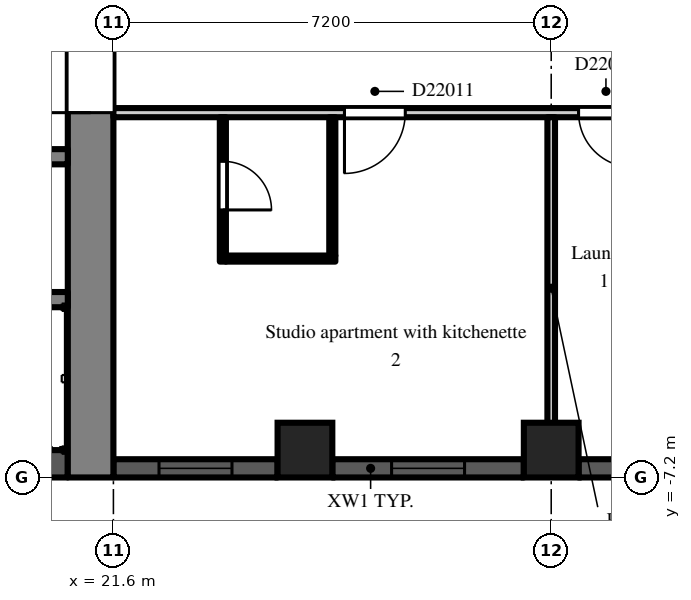
"""IFC4 building model, lengths in metres.
Left out: names, types, materials, properties, quantities, classifications, styles, units other than length and angle.
Written with IfcOpenShell. Run it as: python <this file> out.ifc"""

import sys

from ifc_helpers import new_model, si_unit, direction, frame, frame_2d, origin, origin_2d, place, context, subcontext, project, spatial, rectangle, extrude, element, fill, save


model = new_model("IFC4")
c1 = context("Model", 3, precision=1e-05, world=origin(), true_north=direction((0.0, 1.0)))
c2 = subcontext(c1, "Body", "Model", "MODEL_VIEW")
j1 = project(units=[si_unit("LENGTHUNIT", "METRE"), si_unit("PLANEANGLEUNIT", "RADIAN")], contexts=[c1])
p1 = place(None, origin())
s1 = spatial("IfcSite", under=j1, at=p1, CompositionType="ELEMENT")
p2 = place(p1, origin())
s2 = spatial("IfcBuilding", under=s1, at=p2, CompositionType="ELEMENT")
p3 = place(p2, frame((0.0, 0.0, 159.3)))
s3 = spatial("IfcBuildingStorey", under=s2, at=p3, CompositionType="ELEMENT", Elevation=159.3)
for number, where, z_axis, x_axis in (
    (1, (24.75, -6.75, 0.0), (0.0, 0.0, 1.0), (1.0, 0.0, 0.0)),
    (2, (28.8, -6.75, 0.0), (0.0, 0.0, 1.0), (1.0, 0.0, 0.0)),
):
    element("IfcColumn", number, at=place(p3, frame(where, z_axis=z_axis, x_axis=x_axis)), inside=s3, PredefinedType="COLUMN", context=c2, shape_type="SweptSolid", body=[
        extrude(rectangle(XDim=0.9, YDim=0.9, at=origin_2d()), origin(), (0.0, 0.0, 1.0), 3.0),
    ])
p4 = place(p3, frame((21.6, -7.05, 0.0), z_axis=(0.0, 0.0, 1.0), x_axis=(1.0, 0.0, 0.0)))
e3 = element("IfcWall", 3, at=p4, inside=s3, PredefinedType="SOLIDWALL", context=c2, shape_type="SweptSolid", body=[
    extrude(rectangle(XDim=2.7, YDim=0.3, at=frame_2d((1.35, 0.0))), origin(), (0.0, 0.0, 1.0), 2.2),
])
p5 = place(p4, frame((0.75, 0.0, 0.2)))
e4 = element("IfcOpeningElement", 4, at=p5, cuts=e3, PredefinedType="OPENING", context=c2, shape_type="SweptSolid", body=[
    extrude(rectangle(XDim=1.2, YDim=1.85, at=frame_2d((0.6, 0.925))), frame((0.0, 0.16, 0.0), z_axis=(0.0, -1.0, 0.0), x_axis=(1.0, 0.0, 0.0)), (0.0, 0.0, 1.0), 0.32),
])
p6 = place(p3, frame((25.2, -7.05, 0.0), z_axis=(0.0, 0.0, 1.0), x_axis=(1.0, 0.0, 0.0)))
e5 = element("IfcWall", 5, at=p6, inside=s3, PredefinedType="SOLIDWALL", context=c2, shape_type="SweptSolid", body=[
    extrude(rectangle(XDim=3.15, YDim=0.3, at=frame_2d((1.575, 0.0))), origin(), (0.0, 0.0, 1.0), 2.2),
])
p7 = place(p6, frame((0.975, 0.0, 0.2)))
e6 = element("IfcOpeningElement", 6, at=p7, cuts=e5, PredefinedType="OPENING", context=c2, shape_type="SweptSolid", body=[
    extrude(rectangle(XDim=1.2, YDim=1.85, at=frame_2d((0.6, 0.925))), frame((0.0, 0.16, 0.0), z_axis=(0.0, -1.0, 0.0), x_axis=(1.0, 0.0, 0.0)), (0.0, 0.0, 1.0), 0.32),
])
p8 = place(p3, frame((29.25, -7.05, 0.0), z_axis=(0.0, 0.0, 1.0), x_axis=(1.0, 0.0, 0.0)))
e7 = element("IfcWall", 7, at=p8, inside=s3, PredefinedType="SOLIDWALL", context=c2, shape_type="SweptSolid", body=[
    extrude(rectangle(XDim=6.3, YDim=0.3, at=frame_2d((3.15, 0.0))), origin(), (0.0, 0.0, 1.0), 2.2),
])
p9 = place(p8, frame((4.125, 0.0, 0.2)))
e8 = element("IfcOpeningElement", 8, at=p9, cuts=e7, PredefinedType="OPENING", context=c2, shape_type="SweptSolid", body=[
    extrude(rectangle(XDim=1.2, YDim=1.85, at=frame_2d((0.6, 0.925))), frame((0.0, 0.16, 0.0), z_axis=(0.0, -1.0, 0.0), x_axis=(1.0, 0.0, 0.0)), (0.0, 0.0, 1.0), 0.32),
])
p10 = place(p3, frame((21.225, -7.2, 0.0), z_axis=(0.0, 0.0, 1.0), x_axis=(0.0, 1.0, 0.0)))
e9 = element("IfcWall", 9, at=p10, inside=s3, PredefinedType="SHEAR", context=c2, shape_type="SweptSolid", body=[
    extrude(rectangle(XDim=14.4, YDim=0.75, at=frame_2d((7.2, 0.0))), origin(), (0.0, 0.0, 1.0), 2.55),
])
p11 = place(p10, frame((6.0, 0.0, 0.0)))
e10 = element("IfcOpeningElement", 10, at=p11, cuts=e9, PredefinedType="OPENING", context=c2, shape_type="SweptSolid", body=[
    extrude(rectangle(XDim=2.4, YDim=2.2, at=frame_2d((1.2, 1.1))), frame((0.0, 0.385, 0.0), z_axis=(0.0, -1.0, 0.0), x_axis=(1.0, 0.0, 0.0)), (0.0, 0.0, 1.0), 0.77),
])
p12 = place(p3, frame((7.9, -6.975, 0.0), z_axis=(0.0, 0.0, 1.0), x_axis=(1.0, 0.0, 0.0)))
e11 = element("IfcWall", 11, at=p12, inside=s3, PredefinedType="SHEAR", context=c2, shape_type="SweptSolid", body=[
    extrude(rectangle(XDim=12.95, YDim=0.45, at=frame_2d((6.475, 0.0))), origin(), (0.0, 0.0, 1.0), 2.55),
])
p13 = place(p3, frame((7.9, -1.925, 0.0), z_axis=(0.0, 0.0, 1.0), x_axis=(1.0, 0.0, 0.0)))
e12 = element("IfcWall", 12, at=p13, inside=s3, PredefinedType="SHEAR", context=c2, shape_type="SweptSolid", body=[
    extrude(rectangle(XDim=12.95, YDim=0.25, at=frame_2d((6.475, 0.0))), origin(), (0.0, 0.0, 1.0), 2.55),
])
p14 = place(p13, frame((0.525, 0.0, 0.0)))
e13 = element("IfcOpeningElement", 13, at=p14, cuts=e12, PredefinedType="OPENING", context=c2, shape_type="SweptSolid", body=[
    extrude(rectangle(XDim=0.9, YDim=2.1, at=frame_2d((0.45, 1.05))), frame((0.0, 0.135, 0.0), z_axis=(0.0, -1.0, 0.0), x_axis=(1.0, 0.0, 0.0)), (0.0, 0.0, 1.0), 0.27),
])
p15 = place(p13, frame((2.625, 0.0, 0.0)))
e14 = element("IfcOpeningElement", 14, at=p15, cuts=e12, PredefinedType="OPENING", context=c2, shape_type="SweptSolid", body=[
    extrude(rectangle(XDim=1.1, YDim=2.1, at=frame_2d((0.55, 1.05))), frame((0.0, 0.135, 0.0), z_axis=(0.0, -1.0, 0.0), x_axis=(1.0, 0.0, 0.0)), (0.0, 0.0, 1.0), 0.27),
])
p16 = place(p13, frame((8.225, 0.0, 0.0)))
e15 = element("IfcOpeningElement", 15, at=p16, cuts=e12, PredefinedType="OPENING", context=c2, shape_type="SweptSolid", body=[
    extrude(rectangle(XDim=0.9, YDim=2.1, at=frame_2d((0.45, 1.05))), frame((0.0, 0.135, 0.0), z_axis=(0.0, -1.0, 0.0), x_axis=(1.0, 0.0, 0.0)), (0.0, 0.0, 1.0), 0.27),
])
p17 = place(p3, frame((12.3, -4.275, 0.0), z_axis=(0.0, 0.0, 1.0), x_axis=(1.0, 0.0, 0.0)))
e16 = element("IfcWall", 16, at=p17, inside=s3, PredefinedType="SHEAR", context=c2, shape_type="SweptSolid", body=[
    extrude(rectangle(XDim=8.55, YDim=0.25, at=frame_2d((4.275, 0.0))), origin(), (0.0, 0.0, 1.0), 2.55),
])
p18 = place(p3, frame((21.6, -1.2, 0.0), z_axis=(0.0, 0.0, 1.0), x_axis=(1.0, 0.0, 0.0)))
e17 = element("IfcWall", 17, at=p18, inside=s3, PredefinedType="PARTITIONING", context=c2, shape_type="SweptSolid", body=[
    extrude(rectangle(XDim=14.9, YDim=0.15, at=frame_2d((7.45, 0.0))), origin(), (0.0, 0.0, 1.0), 2.55),
])
p19 = place(p18, frame((3.8, 0.0, 0.0)))
e18 = element("IfcOpeningElement", 18, at=p19, cuts=e17, PredefinedType="OPENING", context=c2, shape_type="SweptSolid", body=[
    extrude(rectangle(XDim=1.0, YDim=2.1, at=frame_2d((0.5, 1.05))), frame((0.0, 0.085, 0.0), z_axis=(0.0, -1.0, 0.0), x_axis=(1.0, 0.0, 0.0)), (0.0, 0.0, 1.0), 0.17),
])
p20 = place(p18, frame((7.65, 0.0, 0.0)))
e19 = element("IfcOpeningElement", 19, at=p20, cuts=e17, PredefinedType="OPENING", context=c2, shape_type="SweptSolid", body=[
    extrude(rectangle(XDim=0.9, YDim=2.1, at=frame_2d((0.45, 1.05))), frame((0.0, 0.085, 0.0), z_axis=(0.0, -1.0, 0.0), x_axis=(1.0, 0.0, 0.0)), (0.0, 0.0, 1.0), 0.17),
])
p21 = place(p18, frame((9.45, 0.0, 0.0)))
e20 = element("IfcOpeningElement", 20, at=p21, cuts=e17, PredefinedType="OPENING", context=c2, shape_type="SweptSolid", body=[
    extrude(rectangle(XDim=0.9, YDim=2.1, at=frame_2d((0.45, 1.05))), frame((0.0, 0.085, 0.0), z_axis=(0.0, -1.0, 0.0), x_axis=(1.0, 0.0, 0.0)), (0.0, 0.0, 1.0), 0.17),
])
p22 = place(p18, frame((11.95, 0.0, 0.0)))
e21 = element("IfcOpeningElement", 21, at=p22, cuts=e17, PredefinedType="OPENING", context=c2, shape_type="SweptSolid", body=[
    extrude(rectangle(XDim=1.8, YDim=2.1, at=frame_2d((0.9, 1.05))), frame((0.0, 0.085, 0.0), z_axis=(0.0, -1.0, 0.0), x_axis=(1.0, 0.0, 0.0)), (0.0, 0.0, 1.0), 0.17),
])
p23 = place(p3, frame((23.4, -3.65, 0.0), z_axis=(0.0, 0.0, 1.0), x_axis=(0.0, 1.0, 0.0)))
e22 = element("IfcWall", 22, at=p23, inside=s3, PredefinedType="PARTITIONING", context=c2, shape_type="SweptSolid", body=[
    extrude(rectangle(XDim=2.375, YDim=0.1, at=frame_2d((1.188, 0.0))), origin(), (0.0, 0.0, 1.0), 2.55),
])
p24 = place(p23, frame((0.85, 0.0, 0.0)))
e23 = element("IfcOpeningElement", 23, at=p24, cuts=e22, PredefinedType="OPENING", context=c2, shape_type="SweptSolid", body=[
    extrude(rectangle(XDim=0.8, YDim=2.1, at=frame_2d((0.4, 1.05))), frame((0.0, 0.06, 0.0), z_axis=(0.0, -1.0, 0.0), x_axis=(1.0, 0.0, 0.0)), (0.0, 0.0, 1.0), 0.12),
])
p25 = place(p3, frame((23.45, -3.6, 0.0), z_axis=(0.0, 0.0, 1.0), x_axis=(1.0, 0.0, 0.0)))
e24 = element("IfcWall", 24, at=p25, inside=s3, PredefinedType="PARTITIONING", context=c2, shape_type="SweptSolid", body=[
    extrude(rectangle(XDim=1.8, YDim=0.1, at=frame_2d((0.9, 0.0))), origin(), (0.0, 0.0, 1.0), 2.55),
])
p26 = place(p3, frame((25.2, -3.55, 0.0), z_axis=(0.0, 0.0, 1.0), x_axis=(0.0, 1.0, 0.0)))
e25 = element("IfcWall", 25, at=p26, inside=s3, PredefinedType="PARTITIONING", context=c2, shape_type="SweptSolid", body=[
    extrude(rectangle(XDim=2.275, YDim=0.1, at=frame_2d((1.138, 0.0))), origin(), (0.0, 0.0, 1.0), 2.55),
])
p27 = place(p3, frame((28.8, -6.9, 0.0), z_axis=(0.0, 0.0, 1.0), x_axis=(0.0, 1.0, 0.0)))
e26 = element("IfcWall", 26, at=p27, inside=s3, PredefinedType="PARTITIONING", context=c2, shape_type="SweptSolid", body=[
    extrude(rectangle(XDim=5.625, YDim=0.125, at=frame_2d((2.812, 0.0))), origin(), (0.0, 0.0, 1.0), 2.55),
])
p28 = place(p5, origin())
e27 = element("IfcWindow", 27, at=p28, inside=s3, PartitioningType="SINGLE_PANEL", PredefinedType="WINDOW", context=c2, shape_type="SweptSolid", body=[
    extrude(rectangle(XDim=1.2, YDim=1.85, at=frame_2d((0.6, 0.925))), frame((0.0, 0.03, 0.0), z_axis=(0.0, -1.0, 0.0), x_axis=(1.0, 0.0, 0.0)), (0.0, 0.0, 1.0), 0.06),
])
fill(e4, e27)
p29 = place(p7, origin())
e28 = element("IfcWindow", 28, at=p29, inside=s3, PartitioningType="SINGLE_PANEL", PredefinedType="WINDOW", context=c2, shape_type="SweptSolid", body=[
    extrude(rectangle(XDim=1.2, YDim=1.85, at=frame_2d((0.6, 0.925))), frame((0.0, 0.03, 0.0), z_axis=(0.0, -1.0, 0.0), x_axis=(1.0, 0.0, 0.0)), (0.0, 0.0, 1.0), 0.06),
])
fill(e6, e28)
p30 = place(p11, origin())
e29 = element("IfcDoor", 29, at=p30, inside=s3, OperationType="DOUBLE_DOOR_DOUBLE_SWING", PredefinedType="DOOR", context=c2, shape_type="SweptSolid", body=[
    extrude(rectangle(XDim=2.4, YDim=2.2, at=frame_2d((1.2, 1.1))), frame((0.0, 0.025, 0.0), z_axis=(0.0, -1.0, 0.0), x_axis=(1.0, 0.0, 0.0)), (0.0, 0.0, 1.0), 0.05),
])
fill(e10, e29)
p31 = place(p24, frame((0.8, 0.0, 0.0), z_axis=(0.0, 0.0, 1.0), x_axis=(-1.0, 0.0, 0.0)))
e30 = element("IfcDoor", 30, at=p31, inside=s3, OperationType="SINGLE_SWING_RIGHT", PredefinedType="DOOR", context=c2, shape_type="SweptSolid", body=[
    extrude(rectangle(XDim=0.8, YDim=2.1, at=frame_2d((0.4, 1.05))), frame((0.0, 0.025, 0.0), z_axis=(0.0, -1.0, 0.0), x_axis=(1.0, 0.0, 0.0)), (0.0, 0.0, 1.0), 0.05),
])
fill(e23, e30)
p32 = place(p19, frame((1.0, 0.0, 0.0), z_axis=(0.0, 0.0, 1.0), x_axis=(-1.0, 0.0, 0.0)))
e31 = element("IfcDoor", 31, at=p32, inside=s3, OperationType="SINGLE_SWING_RIGHT", PredefinedType="DOOR", context=c2, shape_type="SweptSolid", body=[
    extrude(rectangle(XDim=1.0, YDim=2.1, at=frame_2d((0.5, 1.05))), frame((0.0, 0.025, 0.0), z_axis=(0.0, -1.0, 0.0), x_axis=(1.0, 0.0, 0.0)), (0.0, 0.0, 1.0), 0.05),
])
fill(e18, e31)
p33 = place(p20, frame((0.9, 0.0, 0.0), z_axis=(0.0, 0.0, 1.0), x_axis=(-1.0, 0.0, 0.0)))
e32 = element("IfcDoor", 32, at=p33, inside=s3, OperationType="SINGLE_SWING_LEFT", PredefinedType="DOOR", context=c2, shape_type="SweptSolid", body=[
    extrude(rectangle(XDim=0.9, YDim=2.1, at=frame_2d((0.45, 1.05))), frame((0.0, 0.025, 0.0), z_axis=(0.0, -1.0, 0.0), x_axis=(1.0, 0.0, 0.0)), (0.0, 0.0, 1.0), 0.05),
])
fill(e19, e32)
save(model, sys.argv[1])
